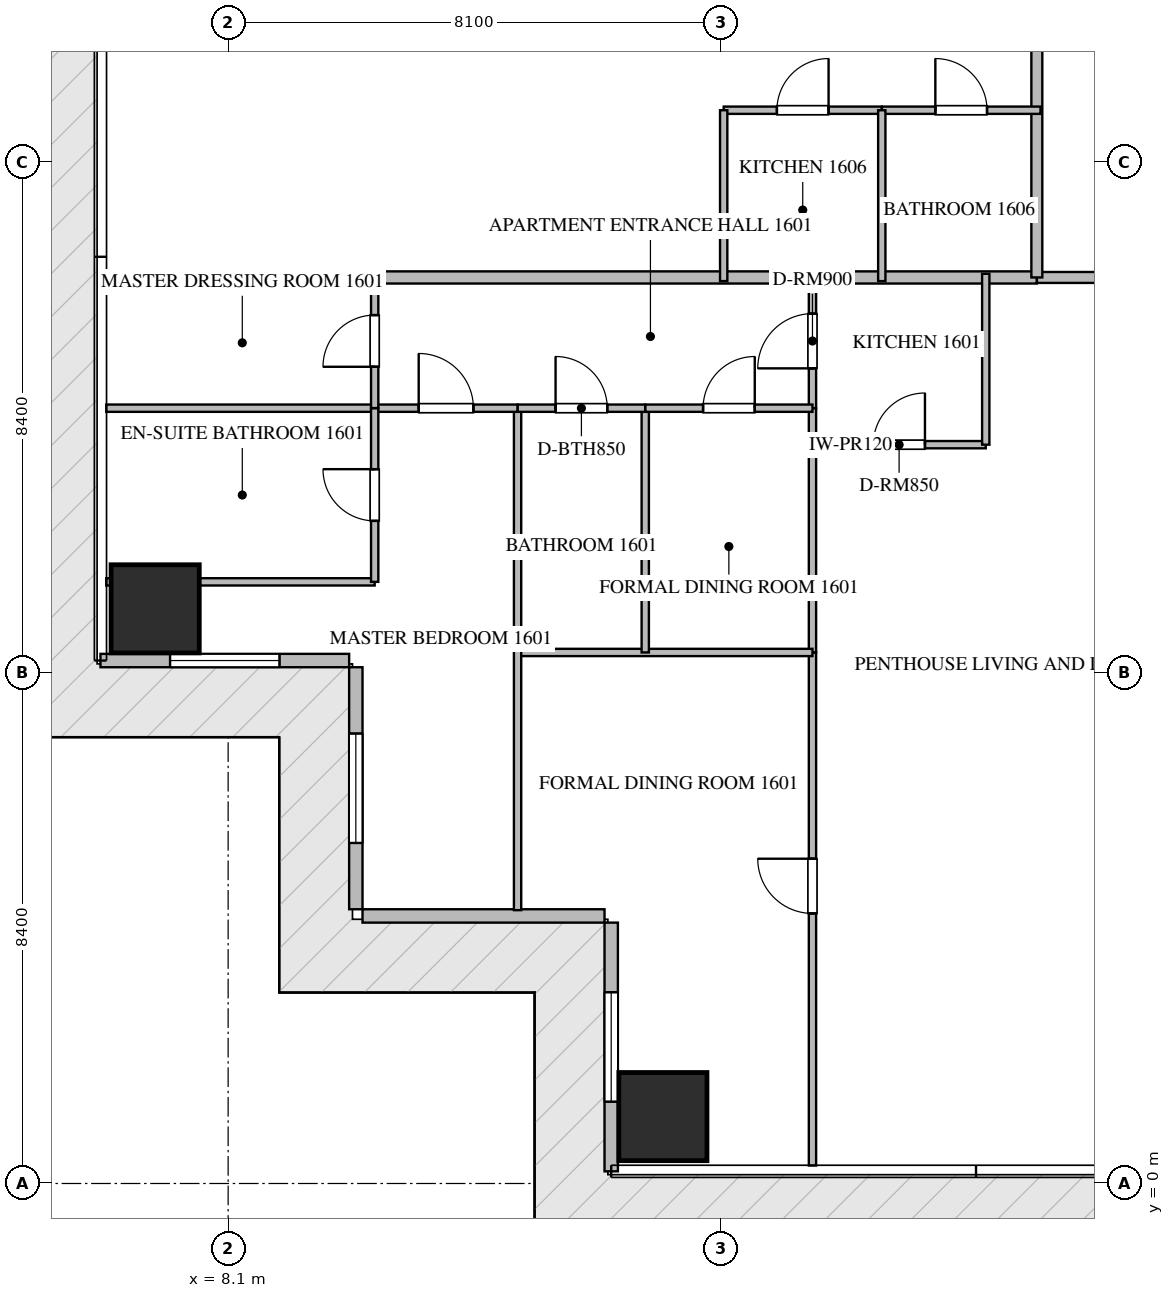
"""IFC4 building model, lengths in metres.
Left out: names, types, materials, properties, quantities, classifications, styles, units other than length and angle.
Written with IfcOpenShell. Run it as: python <this file> out.ifc"""

import sys

from ifc_helpers import new_model, si_unit, direction, frame, frame_2d, origin, origin_2d, place, context, subcontext, project, spatial, rectangle, extrude, source, transform, mapped, element, fill, save


model = new_model("IFC4")
c1 = context("Model", 3, precision=1e-05, world=origin(), true_north=direction((0.0, 1.0)))
c2 = subcontext(c1, "Body", "Model", "MODEL_VIEW")
j1 = project(units=[si_unit("LENGTHUNIT", "METRE"), si_unit("PLANEANGLEUNIT", "RADIAN")], contexts=[c1])
p1 = place(None, origin())
s1 = spatial("IfcSite", under=j1, at=p1, CompositionType="ELEMENT")
p2 = place(p1, origin())
s2 = spatial("IfcBuilding", under=s1, at=p2, CompositionType="ELEMENT")
p3 = place(p2, frame((0.0, 0.0, 67.95)))
s3 = spatial("IfcBuildingStorey", under=s2, at=p3, CompositionType="ELEMENT", Elevation=67.95)
m1 = source(origin(), c2, "Body", "SweptSolid", [
    extrude(rectangle(XDim=1.45, YDim=1.45, at=origin_2d()), origin(), (0.0, 0.0, 1.0), 3.75),
])
for number, where, z_axis, x_axis in (
    (1, (15.25, 1.1, -0.26), (0.0, 0.0, 1.0), (1.0, 0.0, 0.0)),
    (2, (6.9, 9.45, -0.26), (0.0, 0.0, 1.0), (1.0, 0.0, 0.0)),
):
    element("IfcColumn", number, at=place(p3, frame(where, z_axis=z_axis, x_axis=x_axis)), inside=s3, PredefinedType="COLUMN", context=c2, shape_type="MappedRepresentation", body=[
        mapped(m1, transform((0.0, 0.0, 0.0), scale=1.0)),
    ])
p4 = place(p3, frame((6.0, 8.6, 0.0), z_axis=(0.0, 0.0, 1.0), x_axis=(1.0, 0.0, 0.0)))
e3 = element("IfcWall", 3, at=p4, inside=s3, PredefinedType="ELEMENTEDWALL", context=c2, shape_type="SweptSolid", body=[
    extrude(rectangle(XDim=4.09, YDim=0.22, at=frame_2d((2.045, 0.0))), origin(), (0.0, 0.0, 1.0), 3.475),
])
p5 = place(p4, frame((1.145, 0.0, 0.65)))
e4 = element("IfcOpeningElement", 4, at=p5, cuts=e3, PredefinedType="OPENING", context=c2, shape_type="SweptSolid", body=[
    extrude(rectangle(XDim=1.8, YDim=2.1, at=frame_2d((0.9, 1.05))), frame((0.0, 0.12, 0.0), z_axis=(0.0, -1.0, 0.0), x_axis=(1.0, 0.0, 0.0)), (0.0, 0.0, 1.0), 0.24),
])
p6 = place(p3, frame((10.2, 8.49, 0.0), z_axis=(0.0, 0.0, 1.0), x_axis=(0.0, -1.0, 0.0)))
e5 = element("IfcWall", 5, at=p6, inside=s3, PredefinedType="ELEMENTEDWALL", context=c2, shape_type="SweptSolid", body=[
    extrude(rectangle(XDim=3.98, YDim=0.22, at=frame_2d((1.99, 0.0))), origin(), (0.0, 0.0, 1.0), 3.475),
])
p7 = place(p6, frame((1.09, 0.0, 0.65)))
e6 = element("IfcOpeningElement", 6, at=p7, cuts=e5, PredefinedType="OPENING", context=c2, shape_type="SweptSolid", body=[
    extrude(rectangle(XDim=1.8, YDim=2.1, at=frame_2d((0.9, 1.05))), frame((0.0, 0.12, 0.0), z_axis=(0.0, -1.0, 0.0), x_axis=(1.0, 0.0, 0.0)), (0.0, 0.0, 1.0), 0.24),
])
p8 = place(p3, frame((10.31, 4.4, 0.0), z_axis=(0.0, 0.0, 1.0), x_axis=(1.0, 0.0, 0.0)))
e7 = element("IfcWall", 7, at=p8, inside=s3, PredefinedType="ELEMENTEDWALL", context=c2, shape_type="SweptSolid", body=[
    extrude(rectangle(XDim=3.98, YDim=0.22, at=frame_2d((1.99, 0.0))), origin(), (0.0, 0.0, 1.0), 3.475),
])
p9 = place(p3, frame((14.4, 4.29, 0.0), z_axis=(0.0, 0.0, 1.0), x_axis=(0.0, -1.0, 0.0)))
e8 = element("IfcWall", 8, at=p9, inside=s3, PredefinedType="ELEMENTEDWALL", context=c2, shape_type="SweptSolid", body=[
    extrude(rectangle(XDim=4.09, YDim=0.22, at=frame_2d((2.045, 0.0))), origin(), (0.0, 0.0, 1.0), 3.475),
])
p10 = place(p9, frame((1.145, 0.0, 0.65)))
e9 = element("IfcOpeningElement", 9, at=p10, cuts=e8, PredefinedType="OPENING", context=c2, shape_type="SweptSolid", body=[
    extrude(rectangle(XDim=1.8, YDim=2.1, at=frame_2d((0.9, 1.05))), frame((0.0, 0.12, 0.0), z_axis=(0.0, -1.0, 0.0), x_axis=(1.0, 0.0, 0.0)), (0.0, 0.0, 1.0), 0.24),
])
p11 = place(p3, frame((6.082, 14.9, 0.0), z_axis=(0.0, 0.0, 1.0), x_axis=(1.0, 0.0, 0.0)))
e10 = element("IfcWall", 10, at=p11, inside=s3, PredefinedType="PARTITIONING", context=c2, shape_type="SweptSolid", body=[
    extrude(rectangle(XDim=15.318, YDim=0.2, at=frame_2d((7.659, 0.0))), origin(), (0.0, 0.0, 1.0), 3.49),
])
p12 = place(p3, frame((21.402, 14.9, 0.0), z_axis=(0.0, 0.0, 1.0), x_axis=(1.0, 0.0, 0.0)))
e11 = element("IfcWall", 11, at=p12, inside=s3, PredefinedType="PARTITIONING", context=c2, shape_type="SweptSolid", body=[
    extrude(rectangle(XDim=21.996, YDim=0.18, at=frame_2d((10.998, 0.0))), origin(), (0.0, 0.0, 1.0), 3.49),
])
p13 = place(p12, frame((1.96, 0.0, 0.0)))
e12 = element("IfcOpeningElement", 12, at=p13, cuts=e11, PredefinedType="OPENING", context=c2, shape_type="SweptSolid", body=[
    extrude(rectangle(XDim=1.0, YDim=2.15, at=frame_2d((0.5, 1.075))), frame((0.0, 0.1, 0.0), z_axis=(0.0, -1.0, 0.0), x_axis=(1.0, 0.0, 0.0)), (0.0, 0.0, 1.0), 0.2),
])
p14 = place(p12, frame((5.249, 0.0, 0.0)))
e13 = element("IfcOpeningElement", 13, at=p14, cuts=e11, PredefinedType="OPENING", context=c2, shape_type="SweptSolid", body=[
    extrude(rectangle(XDim=1.0, YDim=2.15, at=frame_2d((0.5, 1.075))), frame((0.0, 0.1, 0.0), z_axis=(0.0, -1.0, 0.0), x_axis=(1.0, 0.0, 0.0)), (0.0, 0.0, 1.0), 0.2),
])
p15 = place(p12, frame((11.653, 0.0, 0.0)))
e14 = element("IfcOpeningElement", 14, at=p15, cuts=e11, PredefinedType="OPENING", context=c2, shape_type="SweptSolid", body=[
    extrude(rectangle(XDim=1.0, YDim=2.15, at=frame_2d((0.5, 1.075))), frame((0.0, 0.1, 0.0), z_axis=(0.0, -1.0, 0.0), x_axis=(1.0, 0.0, 0.0)), (0.0, 0.0, 1.0), 0.2),
])
p16 = place(p12, frame((18.896, 0.0, 0.0)))
e15 = element("IfcOpeningElement", 15, at=p16, cuts=e11, PredefinedType="OPENING", context=c2, shape_type="SweptSolid", body=[
    extrude(rectangle(XDim=1.0, YDim=2.15, at=frame_2d((0.5, 1.075))), frame((0.0, 0.1, 0.0), z_axis=(0.0, -1.0, 0.0), x_axis=(1.0, 0.0, 0.0)), (0.0, 0.0, 1.0), 0.2),
])
p17 = place(p3, frame((21.4, 14.9, 0.0), z_axis=(0.0, 0.0, 1.0), x_axis=(0.0, 1.0, 0.0)))
e16 = element("IfcWall", 16, at=p17, inside=s3, PredefinedType="PARTITIONING", context=c2, shape_type="SweptSolid", body=[
    extrude(rectangle(XDim=20.6, YDim=0.18, at=frame_2d((10.3, 0.0))), origin(), (0.0, 0.0, 1.0), 3.49),
])
p18 = place(p17, frame((5.527, 0.0, 0.0)))
e17 = element("IfcOpeningElement", 17, at=p18, cuts=e16, PredefinedType="OPENING", context=c2, shape_type="SweptSolid", body=[
    extrude(rectangle(XDim=1.0, YDim=2.15, at=frame_2d((0.5, 1.075))), frame((0.0, 0.1, 0.0), z_axis=(0.0, -1.0, 0.0), x_axis=(1.0, 0.0, 0.0)), (0.0, 0.0, 1.0), 0.2),
])
p19 = place(p17, frame((10.604, 0.0, 0.0)))
e18 = element("IfcOpeningElement", 18, at=p19, cuts=e16, PredefinedType="OPENING", context=c2, shape_type="SweptSolid", body=[
    extrude(rectangle(XDim=1.0, YDim=2.15, at=frame_2d((0.5, 1.075))), frame((0.0, 0.1, 0.0), z_axis=(0.0, -1.0, 0.0), x_axis=(1.0, 0.0, 0.0)), (0.0, 0.0, 1.0), 0.2),
])
p20 = place(p3, frame((17.71, 12.15, 0.0), z_axis=(0.0, 0.0, 1.0), x_axis=(1.0, 0.0, 0.0)))
e19 = element("IfcWall", 19, at=p20, inside=s3, PredefinedType="PARTITIONING", context=c2, shape_type="SweptSolid", body=[
    extrude(rectangle(XDim=2.85, YDim=0.12, at=frame_2d((1.425, 0.0))), origin(), (0.0, 0.0, 1.0), 3.49),
])
p21 = place(p20, frame((1.0, 0.0, 0.0)))
e20 = element("IfcOpeningElement", 20, at=p21, cuts=e19, PredefinedType="OPENING", context=c2, shape_type="SweptSolid", body=[
    extrude(rectangle(XDim=0.85, YDim=2.1, at=frame_2d((0.425, 1.05))), frame((0.0, 0.07, 0.0), z_axis=(0.0, -1.0, 0.0), x_axis=(1.0, 0.0, 0.0)), (0.0, 0.0, 1.0), 0.14),
])
p22 = place(p3, frame((20.56, 12.15, 0.0), z_axis=(0.0, 0.0, 1.0), x_axis=(0.0, 1.0, 0.0)))
e21 = element("IfcWall", 21, at=p22, inside=s3, PredefinedType="PARTITIONING", context=c2, shape_type="SweptSolid", body=[
    extrude(rectangle(XDim=2.81, YDim=0.12, at=frame_2d((1.405, 0.0))), origin(), (0.0, 0.0, 1.0), 3.49),
])
p23 = place(p3, frame((17.71, 12.75, 0.0), z_axis=(0.0, 0.0, 1.0), x_axis=(0.0, 1.0, 0.0)))
e22 = element("IfcWall", 22, at=p23, inside=s3, PredefinedType="PARTITIONING", context=c2, shape_type="SweptSolid", body=[
    extrude(rectangle(XDim=2.21, YDim=0.12, at=frame_2d((1.105, 0.0))), origin(), (0.0, 0.0, 1.0), 3.49),
])
p24 = place(p23, frame((0.655, 0.0, 0.0)))
e23 = element("IfcOpeningElement", 23, at=p24, cuts=e22, PredefinedType="OPENING", context=c2, shape_type="SweptSolid", body=[
    extrude(rectangle(XDim=0.9, YDim=2.1, at=frame_2d((0.45, 1.05))), frame((0.0, 0.07, 0.0), z_axis=(0.0, -1.0, 0.0), x_axis=(1.0, 0.0, 0.0)), (0.0, 0.0, 1.0), 0.14),
])
p25 = place(p3, frame((17.71, 0.295, 0.0), z_axis=(0.0, 0.0, 1.0), x_axis=(0.0, 1.0, 0.0)))
e24 = element("IfcWall", 24, at=p25, inside=s3, PredefinedType="PARTITIONING", context=c2, shape_type="SweptSolid", body=[
    extrude(rectangle(XDim=8.438, YDim=0.12, at=frame_2d((4.219, 0.0))), origin(), (0.0, 0.0, 1.0), 3.49),
])
p26 = place(p25, frame((4.146, 0.0, 0.0)))
e25 = element("IfcOpeningElement", 25, at=p26, cuts=e24, PredefinedType="OPENING", context=c2, shape_type="SweptSolid", body=[
    extrude(rectangle(XDim=0.9, YDim=2.1, at=frame_2d((0.45, 1.05))), frame((0.0, 0.07, 0.0), z_axis=(0.0, -1.0, 0.0), x_axis=(1.0, 0.0, 0.0)), (0.0, 0.0, 1.0), 0.14),
])
p27 = place(p3, frame((17.71, 8.735, 0.0), z_axis=(0.0, 0.0, 1.0), x_axis=(0.0, 1.0, 0.0)))
e26 = element("IfcWall", 26, at=p27, inside=s3, PredefinedType="PARTITIONING", context=c2, shape_type="SweptSolid", body=[
    extrude(rectangle(XDim=4.013, YDim=0.12, at=frame_2d((2.006, 0.0))), origin(), (0.0, 0.0, 1.0), 3.49),
])
p28 = place(p3, frame((12.86, 8.733, 0.0), z_axis=(0.0, 0.0, 1.0), x_axis=(1.0, 0.0, 0.0)))
e27 = element("IfcWall", 27, at=p28, inside=s3, PredefinedType="PARTITIONING", context=c2, shape_type="SweptSolid", body=[
    extrude(rectangle(XDim=4.85, YDim=0.12, at=frame_2d((2.425, 0.0))), origin(), (0.0, 0.0, 1.0), 3.49),
])
p29 = place(p3, frame((12.86, 4.495, 0.0), z_axis=(0.0, 0.0, 1.0), x_axis=(0.0, 1.0, 0.0)))
e28 = element("IfcWall", 28, at=p29, inside=s3, PredefinedType="PARTITIONING", context=c2, shape_type="SweptSolid", body=[
    extrude(rectangle(XDim=8.255, YDim=0.12, at=frame_2d((4.127, 0.0))), origin(), (0.0, 0.0, 1.0), 3.49),
])
p30 = place(p3, frame((14.96, 8.733, 0.0), z_axis=(0.0, 0.0, 1.0), x_axis=(0.0, 1.0, 0.0)))
e29 = element("IfcWall", 29, at=p30, inside=s3, PredefinedType="PARTITIONING", context=c2, shape_type="SweptSolid", body=[
    extrude(rectangle(XDim=4.017, YDim=0.12, at=frame_2d((2.009, 0.0))), origin(), (0.0, 0.0, 1.0), 3.49),
])
p31 = place(p3, frame((12.86, 12.75, 0.0), z_axis=(0.0, 0.0, 1.0), x_axis=(1.0, 0.0, 0.0)))
e30 = element("IfcWall", 30, at=p31, inside=s3, PredefinedType="PARTITIONING", context=c2, shape_type="SweptSolid", body=[
    extrude(rectangle(XDim=2.1, YDim=0.12, at=frame_2d((1.05, 0.0))), origin(), (0.0, 0.0, 1.0), 3.49),
])
p32 = place(p31, frame((0.625, 0.0, 0.0)))
e31 = element("IfcOpeningElement", 31, at=p32, cuts=e30, PredefinedType="OPENING", context=c2, shape_type="SweptSolid", body=[
    extrude(rectangle(XDim=0.85, YDim=2.1, at=frame_2d((0.425, 1.05))), frame((0.0, 0.07, 0.0), z_axis=(0.0, -1.0, 0.0), x_axis=(1.0, 0.0, 0.0)), (0.0, 0.0, 1.0), 0.14),
])
p33 = place(p3, frame((14.962, 12.75, 0.0), z_axis=(0.0, 0.0, 1.0), x_axis=(1.0, 0.0, 0.0)))
e32 = element("IfcWall", 32, at=p33, inside=s3, PredefinedType="PARTITIONING", context=c2, shape_type="SweptSolid", body=[
    extrude(rectangle(XDim=2.748, YDim=0.12, at=frame_2d((1.374, 0.0))), origin(), (0.0, 0.0, 1.0), 3.49),
])
p34 = place(p33, frame((0.949, 0.0, 0.0)))
e33 = element("IfcOpeningElement", 33, at=p34, cuts=e32, PredefinedType="OPENING", context=c2, shape_type="SweptSolid", body=[
    extrude(rectangle(XDim=0.85, YDim=2.1, at=frame_2d((0.425, 1.05))), frame((0.0, 0.07, 0.0), z_axis=(0.0, -1.0, 0.0), x_axis=(1.0, 0.0, 0.0)), (0.0, 0.0, 1.0), 0.14),
])
p35 = place(p3, frame((10.51, 12.75, 0.0), z_axis=(0.0, 0.0, 1.0), x_axis=(1.0, 0.0, 0.0)))
e34 = element("IfcWall", 34, at=p35, inside=s3, PredefinedType="PARTITIONING", context=c2, shape_type="SweptSolid", body=[
    extrude(rectangle(XDim=2.348, YDim=0.12, at=frame_2d((1.174, 0.0))), origin(), (0.0, 0.0, 1.0), 3.49),
])
p36 = place(p35, frame((0.724, 0.0, 0.0)))
e35 = element("IfcOpeningElement", 35, at=p36, cuts=e34, PredefinedType="OPENING", context=c2, shape_type="SweptSolid", body=[
    extrude(rectangle(XDim=0.9, YDim=2.1, at=frame_2d((0.45, 1.05))), frame((0.0, 0.07, 0.0), z_axis=(0.0, -1.0, 0.0), x_axis=(1.0, 0.0, 0.0)), (0.0, 0.0, 1.0), 0.14),
])
p37 = place(p3, frame((6.095, 9.894, 0.0), z_axis=(0.0, 0.0, 1.0), x_axis=(1.0, 0.0, 0.0)))
e36 = element("IfcWall", 36, at=p37, inside=s3, PredefinedType="PARTITIONING", context=c2, shape_type="SweptSolid", body=[
    extrude(rectangle(XDim=4.415, YDim=0.12, at=frame_2d((2.208, 0.0))), origin(), (0.0, 0.0, 1.0), 3.49),
])
p38 = place(p3, frame((6.095, 12.75, 0.0), z_axis=(0.0, 0.0, 1.0), x_axis=(1.0, 0.0, 0.0)))
e37 = element("IfcWall", 37, at=p38, inside=s3, PredefinedType="PARTITIONING", context=c2, shape_type="SweptSolid", body=[
    extrude(rectangle(XDim=4.413, YDim=0.12, at=frame_2d((2.207, 0.0))), origin(), (0.0, 0.0, 1.0), 3.49),
])
p39 = place(p3, frame((10.51, 9.894, 0.0), z_axis=(0.0, 0.0, 1.0), x_axis=(0.0, 1.0, 0.0)))
e38 = element("IfcWall", 38, at=p39, inside=s3, PredefinedType="PARTITIONING", context=c2, shape_type="SweptSolid", body=[
    extrude(rectangle(XDim=2.856, YDim=0.12, at=frame_2d((1.428, 0.0))), origin(), (0.0, 0.0, 1.0), 3.49),
])
p40 = place(p39, frame((1.003, 0.0, 0.0)))
e39 = element("IfcOpeningElement", 39, at=p40, cuts=e38, PredefinedType="OPENING", context=c2, shape_type="SweptSolid", body=[
    extrude(rectangle(XDim=0.85, YDim=2.1, at=frame_2d((0.425, 1.05))), frame((0.0, 0.07, 0.0), z_axis=(0.0, -1.0, 0.0), x_axis=(1.0, 0.0, 0.0)), (0.0, 0.0, 1.0), 0.14),
])
p41 = place(p3, frame((10.51, 12.752, 0.0), z_axis=(0.0, 0.0, 1.0), x_axis=(0.0, 1.0, 0.0)))
e40 = element("IfcWall", 40, at=p41, inside=s3, PredefinedType="PARTITIONING", context=c2, shape_type="SweptSolid", body=[
    extrude(rectangle(XDim=2.208, YDim=0.12, at=frame_2d((1.104, 0.0))), origin(), (0.0, 0.0, 1.0), 3.49),
])
p42 = place(p41, frame((0.679, 0.0, 0.0)))
e41 = element("IfcOpeningElement", 41, at=p42, cuts=e40, PredefinedType="OPENING", context=c2, shape_type="SweptSolid", body=[
    extrude(rectangle(XDim=0.85, YDim=2.1, at=frame_2d((0.425, 1.05))), frame((0.0, 0.07, 0.0), z_axis=(0.0, -1.0, 0.0), x_axis=(1.0, 0.0, 0.0)), (0.0, 0.0, 1.0), 0.14),
])
p43 = place(p3, frame((16.25, 17.65, 0.0), z_axis=(0.0, 0.0, 1.0), x_axis=(1.0, 0.0, 0.0)))
e42 = element("IfcWall", 42, at=p43, inside=s3, PredefinedType="PARTITIONING", context=c2, shape_type="SweptSolid", body=[
    extrude(rectangle(XDim=2.6, YDim=0.12, at=frame_2d((1.3, 0.0))), origin(), (0.0, 0.0, 1.0), 3.49),
])
p44 = place(p43, frame((0.875, 0.0, 0.0)))
e43 = element("IfcOpeningElement", 43, at=p44, cuts=e42, PredefinedType="OPENING", context=c2, shape_type="SweptSolid", body=[
    extrude(rectangle(XDim=0.85, YDim=2.1, at=frame_2d((0.425, 1.05))), frame((0.0, 0.07, 0.0), z_axis=(0.0, -1.0, 0.0), x_axis=(1.0, 0.0, 0.0)), (0.0, 0.0, 1.0), 0.14),
])
p45 = place(p3, frame((18.852, 17.65, 0.0), z_axis=(0.0, 0.0, 1.0), x_axis=(1.0, 0.0, 0.0)))
e44 = element("IfcWall", 44, at=p45, inside=s3, PredefinedType="PARTITIONING", context=c2, shape_type="SweptSolid", body=[
    extrude(rectangle(XDim=2.608, YDim=0.12, at=frame_2d((1.304, 0.0))), origin(), (0.0, 0.0, 1.0), 3.49),
])
p46 = place(p45, frame((0.879, 0.0, 0.0)))
e45 = element("IfcOpeningElement", 45, at=p46, cuts=e44, PredefinedType="OPENING", context=c2, shape_type="SweptSolid", body=[
    extrude(rectangle(XDim=0.85, YDim=2.1, at=frame_2d((0.425, 1.05))), frame((0.0, 0.07, 0.0), z_axis=(0.0, -1.0, 0.0), x_axis=(1.0, 0.0, 0.0)), (0.0, 0.0, 1.0), 0.14),
])
for number, where, z_axis, x_axis in (
    (46, (18.85, 14.84, 0.0), (0.0, 0.0, 1.0), (0.0, 1.0, 0.0)),
    (47, (16.25, 14.84, 0.0), (0.0, 0.0, 1.0), (0.0, 1.0, 0.0)),
):
    element("IfcWall", number, at=place(p3, frame(where, z_axis=z_axis, x_axis=x_axis)), inside=s3, PredefinedType="PARTITIONING", context=c2, shape_type="SweptSolid", body=[
        extrude(rectangle(XDim=2.81, YDim=0.12, at=frame_2d((1.405, 0.0))), origin(), (0.0, 0.0, 1.0), 3.49),
    ])
m2 = source(origin(), c2, "Body", "SweptSolid", [
    extrude(rectangle(XDim=1.8, YDim=2.1, at=frame_2d((0.9, 1.05))), frame((0.0, 0.03, 0.0), z_axis=(0.0, -1.0, 0.0), x_axis=(1.0, 0.0, 0.0)), (0.0, 0.0, 1.0), 0.06),
])
p47 = place(p5, origin())
e48 = element("IfcWindow", 48, at=p47, inside=s3, PartitioningType="SINGLE_PANEL", PredefinedType="WINDOW", context=c2, shape_type="MappedRepresentation", body=[
    mapped(m2, transform((0.0, 0.0, 0.0), scale=1.0)),
])
fill(e4, e48)
p48 = place(p7, origin())
e49 = element("IfcWindow", 49, at=p48, inside=s3, PartitioningType="SINGLE_PANEL", PredefinedType="WINDOW", context=c2, shape_type="MappedRepresentation", body=[
    mapped(m2, transform((0.0, 0.0, 0.0), scale=1.0)),
])
fill(e6, e49)
p49 = place(p10, origin())
e50 = element("IfcWindow", 50, at=p49, inside=s3, PartitioningType="SINGLE_PANEL", PredefinedType="WINDOW", context=c2, shape_type="MappedRepresentation", body=[
    mapped(m2, transform((0.0, 0.0, 0.0), scale=1.0)),
])
fill(e9, e50)
m3 = source(origin(), c2, "Body", "SweptSolid", [
    extrude(rectangle(XDim=0.85, YDim=2.1, at=frame_2d((0.425, 1.05))), frame((0.0, 0.025, 0.0), z_axis=(0.0, -1.0, 0.0), x_axis=(1.0, 0.0, 0.0)), (0.0, 0.0, 1.0), 0.05),
])
p50 = place(p21, origin())
e51 = element("IfcDoor", 51, at=p50, inside=s3, OperationType="SINGLE_SWING_RIGHT", PredefinedType="DOOR", context=c2, shape_type="MappedRepresentation", body=[
    mapped(m3, transform((0.0, 0.0, 0.0), scale=1.0)),
])
fill(e20, e51)
m4 = source(origin(), c2, "Body", "SweptSolid", [
    extrude(rectangle(XDim=0.9, YDim=2.1, at=frame_2d((0.45, 1.05))), frame((0.0, 0.025, 0.0), z_axis=(0.0, -1.0, 0.0), x_axis=(1.0, 0.0, 0.0)), (0.0, 0.0, 1.0), 0.05),
])
p51 = place(p24, origin())
e52 = element("IfcDoor", 52, at=p51, inside=s3, OperationType="SINGLE_SWING_LEFT", PredefinedType="DOOR", context=c2, shape_type="MappedRepresentation", body=[
    mapped(m4, transform((0.0, 0.0, 0.0), scale=1.0)),
])
fill(e23, e52)
p52 = place(p26, origin())
e53 = element("IfcDoor", 53, at=p52, inside=s3, OperationType="SINGLE_SWING_RIGHT", PredefinedType="DOOR", context=c2, shape_type="MappedRepresentation", body=[
    mapped(m4, transform((0.0, 0.0, 0.0), scale=1.0)),
])
fill(e25, e53)
p53 = place(p32, origin())
e54 = element("IfcDoor", 54, at=p53, inside=s3, OperationType="SINGLE_SWING_LEFT", PredefinedType="DOOR", context=c2, shape_type="MappedRepresentation", body=[
    mapped(m3, transform((0.0, 0.0, 0.0), scale=1.0)),
])
fill(e31, e54)
p54 = place(p34, origin())
e55 = element("IfcDoor", 55, at=p54, inside=s3, OperationType="SINGLE_SWING_RIGHT", PredefinedType="DOOR", context=c2, shape_type="MappedRepresentation", body=[
    mapped(m3, transform((0.0, 0.0, 0.0), scale=1.0)),
])
fill(e33, e55)
p55 = place(p36, origin())
e56 = element("IfcDoor", 56, at=p55, inside=s3, OperationType="SINGLE_SWING_LEFT", PredefinedType="DOOR", context=c2, shape_type="MappedRepresentation", body=[
    mapped(m4, transform((0.0, 0.0, 0.0), scale=1.0)),
])
fill(e35, e56)
p56 = place(p40, origin())
e57 = element("IfcDoor", 57, at=p56, inside=s3, OperationType="SINGLE_SWING_RIGHT", PredefinedType="DOOR", context=c2, shape_type="MappedRepresentation", body=[
    mapped(m3, transform((0.0, 0.0, 0.0), scale=1.0)),
])
fill(e39, e57)
p57 = place(p42, origin())
e58 = element("IfcDoor", 58, at=p57, inside=s3, OperationType="SINGLE_SWING_LEFT", PredefinedType="DOOR", context=c2, shape_type="MappedRepresentation", body=[
    mapped(m3, transform((0.0, 0.0, 0.0), scale=1.0)),
])
fill(e41, e58)
p58 = place(p44, origin())
e59 = element("IfcDoor", 59, at=p58, inside=s3, OperationType="SINGLE_SWING_RIGHT", PredefinedType="DOOR", context=c2, shape_type="MappedRepresentation", body=[
    mapped(m3, transform((0.0, 0.0, 0.0), scale=1.0)),
])
fill(e43, e59)
p59 = place(p46, origin())
e60 = element("IfcDoor", 60, at=p59, inside=s3, OperationType="SINGLE_SWING_LEFT", PredefinedType="DOOR", context=c2, shape_type="MappedRepresentation", body=[
    mapped(m3, transform((0.0, 0.0, 0.0), scale=1.0)),
])
fill(e45, e60)
save(model, sys.argv[1])
